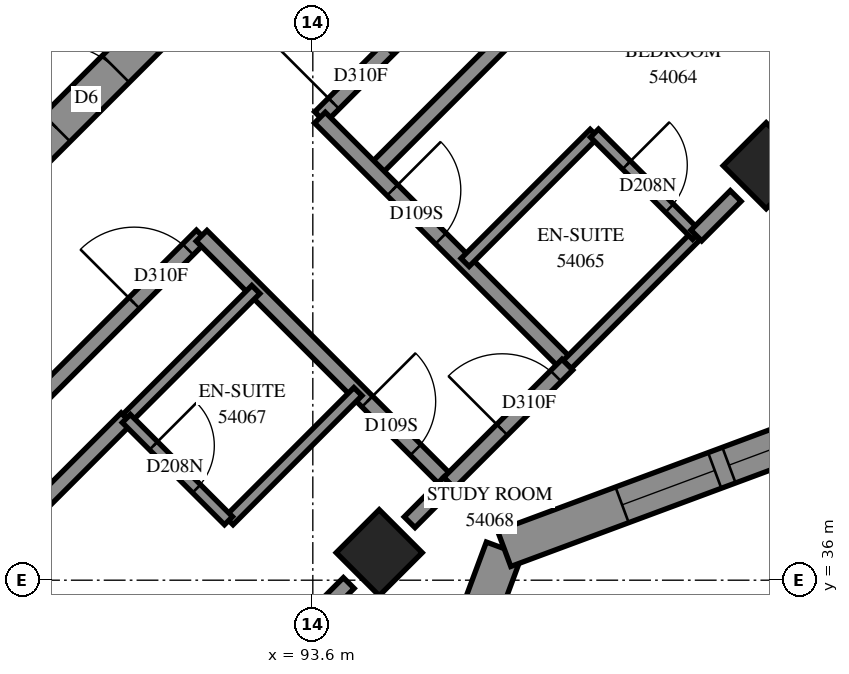
"""IFC4 building model, lengths in metres.
Left out: names, types, materials, properties, quantities, classifications, styles, units other than length and angle.
Written with IfcOpenShell. Run it as: python <this file> out.ifc"""

import sys

from ifc_helpers import new_model, si_unit, direction, frame, frame_2d, origin, origin_2d, place, context, subcontext, project, spatial, polyline, rectangle, outline, extrude, element, fill, save


model = new_model("IFC4")
c1 = context("Model", 3, precision=1e-05, world=origin(), true_north=direction((0.0, 1.0)))
c2 = subcontext(c1, "Body", "Model", "MODEL_VIEW")
j1 = project(units=[si_unit("LENGTHUNIT", "METRE"), si_unit("PLANEANGLEUNIT", "RADIAN")], contexts=[c1])
p1 = place(None, origin())
s1 = spatial("IfcSite", under=j1, at=p1, CompositionType="ELEMENT")
p2 = place(p1, origin())
s2 = spatial("IfcBuilding", under=s1, at=p2, CompositionType="ELEMENT")
p3 = place(p2, frame((0.0, 0.0, 199.8)))
s3 = spatial("IfcBuildingStorey", under=s2, at=p3, CompositionType="ELEMENT", Elevation=199.8)
for number, where, z_axis, x_axis in (
    (1, (99.565, 41.453, 0.0), (0.0, 0.0, 1.0), (0.707, -0.707, 0.0)),
    (2, (94.474, 36.362, 0.0), (0.0, 0.0, 1.0), (0.707, -0.707, 0.0)),
):
    element("IfcColumn", number, at=place(p3, frame(where, z_axis=z_axis, x_axis=x_axis)), inside=s3, PredefinedType="COLUMN", context=c2, shape_type="SweptSolid", body=[
        extrude(rectangle(XDim=0.8, YDim=0.8, at=origin_2d()), origin(), (0.0, 0.0, 1.0), 3.1),
    ])
p4 = place(p3, frame((87.013, 38.731, -0.3), z_axis=(0.0, 0.0, 1.0), x_axis=(0.7071067812, 0.7071067812, 0.0)))
e3 = element("IfcWall", 3, at=p4, inside=s3, PredefinedType="SHEAR", context=c2, shape_type="SweptSolid", body=[
    extrude(rectangle(XDim=14.4, YDim=0.5, at=frame_2d((7.2, 0.0))), origin(), (0.0, 0.0, 1.0), 2.7),
])
p5 = place(p4, frame((4.55, 0.0, 0.3)))
e4 = element("IfcOpeningElement", 4, at=p5, cuts=e3, PredefinedType="OPENING", context=c2, shape_type="SweptSolid", body=[
    extrude(rectangle(XDim=1.1, YDim=2.1, at=frame_2d((0.55, 1.05))), frame((0.0, 0.26, 0.0), z_axis=(0.0, -1.0, 0.0), x_axis=(1.0, 0.0, 0.0)), (0.0, 0.0, 1.0), 0.52),
])
p6 = place(p4, frame((11.35, 0.0, 0.3)))
e5 = element("IfcOpeningElement", 5, at=p6, cuts=e3, PredefinedType="OPENING", context=c2, shape_type="SweptSolid", body=[
    extrude(rectangle(XDim=1.1, YDim=2.1, at=frame_2d((0.55, 1.05))), frame((0.0, 0.26, 0.0), z_axis=(0.0, -1.0, 0.0), x_axis=(1.0, 0.0, 0.0)), (0.0, 0.0, 1.0), 0.52),
])
p7 = place(p3, frame((94.281, 31.47, 0.0), z_axis=(0.0, 0.0, 1.0), x_axis=(0.3481903374, 0.9374238577, 0.0)))
e6 = element("IfcWall", 6, at=p7, inside=s3, PredefinedType="SOLIDWALL", context=c2, shape_type="SweptSolid", body=[
    extrude(outline(polyline([(-0.12, -0.25), (5.16, -0.25), (5.39, 0.25), (0.12, 0.25), (-0.12, -0.25)])), origin(), (0.0, 0.0, 1.0), 3.1),
])
p8 = place(p7, frame((1.512, 0.0, 0.45)))
e7 = element("IfcOpeningElement", 7, at=p8, cuts=e6, PredefinedType="OPENING", context=c2, shape_type="SweptSolid", body=[
    extrude(rectangle(XDim=1.3, YDim=2.5, at=frame_2d((0.65, 1.25))), frame((0.0, 0.26, 0.0), z_axis=(0.0, -1.0, 0.0), x_axis=(1.0, 0.0, 0.0)), (0.0, 0.0, 1.0), 0.52),
])
p9 = place(p7, frame((3.012, 0.0, 0.45)))
e8 = element("IfcOpeningElement", 8, at=p9, cuts=e6, PredefinedType="OPENING", context=c2, shape_type="SweptSolid", body=[
    extrude(rectangle(XDim=1.3, YDim=2.5, at=frame_2d((0.65, 1.25))), frame((0.0, 0.26, 0.0), z_axis=(0.0, -1.0, 0.0), x_axis=(1.0, 0.0, 0.0)), (0.0, 0.0, 1.0), 0.52),
])
p10 = place(p3, frame((96.118, 36.415, 0.0), z_axis=(0.0, 0.0, 1.0), x_axis=(0.9374238577, 0.3481903374, 0.0)))
e9 = element("IfcWall", 9, at=p10, inside=s3, PredefinedType="SOLIDWALL", context=c2, shape_type="SweptSolid", body=[
    extrude(outline(polyline([(0.115, -0.25), (5.395, -0.25), (5.155, 0.25), (-0.115, 0.25), (0.115, -0.25)])), origin(), (0.0, 0.0, 1.0), 3.1),
])
p11 = place(p10, frame((1.655, 0.0, 0.45)))
e10 = element("IfcOpeningElement", 10, at=p11, cuts=e9, PredefinedType="OPENING", context=c2, shape_type="SweptSolid", body=[
    extrude(rectangle(XDim=1.3, YDim=2.5, at=frame_2d((0.65, 1.25))), frame((0.0, 0.26, 0.0), z_axis=(0.0, -1.0, 0.0), x_axis=(1.0, 0.0, 0.0)), (0.0, 0.0, 1.0), 0.52),
])
p12 = place(p10, frame((3.155, 0.0, 0.45)))
e11 = element("IfcOpeningElement", 11, at=p12, cuts=e9, PredefinedType="OPENING", context=c2, shape_type="SweptSolid", body=[
    extrude(rectangle(XDim=1.3, YDim=2.5, at=frame_2d((0.65, 1.25))), frame((0.0, 0.26, 0.0), z_axis=(0.0, -1.0, 0.0), x_axis=(1.0, 0.0, 0.0)), (0.0, 0.0, 1.0), 0.52),
])
p13 = place(p3, frame((93.695, 42.091, 0.0), z_axis=(0.0, 0.0, 1.0), x_axis=(0.7071067812, 0.7071067812, 0.0)))
e12 = element("IfcWall", 12, at=p13, inside=s3, PredefinedType="PARTITIONING", context=c2, shape_type="SweptSolid", body=[
    extrude(rectangle(XDim=9.899, YDim=0.2, at=frame_2d((4.95, 0.0))), origin(), (0.0, 0.0, 1.0), 3.1),
])
p14 = place(p13, frame((0.255, 0.0, 0.0)))
e13 = element("IfcOpeningElement", 13, at=p14, cuts=e12, PredefinedType="OPENING", context=c2, shape_type="SweptSolid", body=[
    extrude(rectangle(XDim=1.0, YDim=2.1, at=frame_2d((0.5, 1.05))), frame((0.0, 0.11, 0.0), z_axis=(0.0, -1.0, 0.0), x_axis=(1.0, 0.0, 0.0)), (0.0, 0.0, 1.0), 0.22),
])
p15 = place(p3, frame((84.984, 31.966, 0.0), z_axis=(0.0, 0.0, 1.0), x_axis=(0.7071067812, 0.7071067812, 0.0)))
e14 = element("IfcWall", 14, at=p15, inside=s3, PredefinedType="PARTITIONING", context=c2, shape_type="SweptSolid", body=[
    extrude(rectangle(XDim=8.719, YDim=0.2, at=frame_2d((4.359, 0.0))), origin(), (0.0, 0.0, 1.0), 3.1),
])
p16 = place(p3, frame((86.835, 35.231, 0.0), z_axis=(0.0, 0.0, 1.0), x_axis=(0.7071067812, 0.7071067812, 0.0)))
e15 = element("IfcWall", 15, at=p16, inside=s3, PredefinedType="PARTITIONING", context=c2, shape_type="SweptSolid", body=[
    extrude(rectangle(XDim=7.501, YDim=0.2, at=frame_2d((3.751, 0.0))), origin(), (0.0, 0.0, 1.0), 3.1),
])
p17 = place(p16, frame((6.243, 0.0, 0.0)))
e16 = element("IfcOpeningElement", 16, at=p17, cuts=e15, PredefinedType="OPENING", context=c2, shape_type="SweptSolid", body=[
    extrude(rectangle(XDim=1.0, YDim=2.1, at=frame_2d((0.5, 1.05))), frame((0.0, 0.11, 0.0), z_axis=(0.0, -1.0, 0.0), x_axis=(1.0, 0.0, 0.0)), (0.0, 0.0, 1.0), 0.22),
])
p18 = place(p3, frame((94.402, 41.382, 0.0), z_axis=(0.0, 0.0, 1.0), x_axis=(0.7072538072, 0.7069597246, 0.0)))
e17 = element("IfcWall", 17, at=p18, inside=s3, PredefinedType="PARTITIONING", context=c2, shape_type="SweptSolid", body=[
    extrude(rectangle(XDim=6.801, YDim=0.2, at=frame_2d((3.4, 0.0))), origin(), (0.0, 0.0, 1.0), 3.1),
])
p19 = place(p3, frame((89.781, 31.671, 0.0), z_axis=(0.0, 0.0, 1.0), x_axis=(0.7071067812, 0.7071067812, 0.0)))
e18 = element("IfcWall", 18, at=p19, inside=s3, PredefinedType="PARTITIONING", context=c2, shape_type="SweptSolid", body=[
    extrude(rectangle(XDim=6.07, YDim=0.2, at=frame_2d((3.035, 0.0))), origin(), (0.0, 0.0, 1.0), 2.6),
])
p20 = place(p3, frame((93.693, 42.085, 0.0), z_axis=(0.0, 0.0, 1.0), x_axis=(0.7071067812, -0.7071067812, 0.0)))
e19 = element("IfcWall", 19, at=p20, inside=s3, PredefinedType="PARTITIONING", context=c2, shape_type="SweptSolid", body=[
    extrude(rectangle(XDim=4.599, YDim=0.2, at=frame_2d((2.3, 0.0))), origin(), (0.0, 0.0, 1.0), 3.1),
])
p21 = place(p20, frame((1.349, 0.0, 0.0)))
e20 = element("IfcOpeningElement", 20, at=p21, cuts=e19, PredefinedType="OPENING", context=c2, shape_type="SweptSolid", body=[
    extrude(rectangle(XDim=0.9, YDim=2.1, at=frame_2d((0.45, 1.05))), frame((0.0, 0.11, 0.0), z_axis=(0.0, -1.0, 0.0), x_axis=(1.0, 0.0, 0.0)), (0.0, 0.0, 1.0), 0.22),
])
p22 = place(p3, frame((92.137, 40.531, 0.0), z_axis=(0.0, 0.0, 1.0), x_axis=(0.7071067812, -0.7071067812, 0.0)))
e21 = element("IfcWall", 21, at=p22, inside=s3, PredefinedType="PARTITIONING", context=c2, shape_type="SweptSolid", body=[
    extrude(rectangle(XDim=4.599, YDim=0.2, at=frame_2d((2.3, 0.0))), origin(), (0.0, 0.0, 1.0), 3.1),
])
p23 = place(p22, frame((3.083, 0.0, 0.0)))
e22 = element("IfcOpeningElement", 22, at=p23, cuts=e21, PredefinedType="OPENING", context=c2, shape_type="SweptSolid", body=[
    extrude(rectangle(XDim=0.9, YDim=2.1, at=frame_2d((0.45, 1.05))), frame((0.0, 0.11, 0.0), z_axis=(0.0, -1.0, 0.0), x_axis=(1.0, 0.0, 0.0)), (0.0, 0.0, 1.0), 0.22),
])
p24 = place(p3, frame((95.603, 40.181, 0.0), z_axis=(0.0, 0.0, 1.0), x_axis=(0.7071067812, 0.7071067812, 0.0)))
e23 = element("IfcWall", 23, at=p24, inside=s3, PredefinedType="PARTITIONING", context=c2, shape_type="SweptSolid", body=[
    extrude(rectangle(XDim=2.401, YDim=0.15, at=frame_2d((1.201, 0.0))), origin(), (0.0, 0.0, 1.0), 3.1),
])
p25 = place(p3, frame((96.947, 38.837, 0.0), z_axis=(0.0, 0.0, 1.0), x_axis=(0.7071067812, 0.7071067812, 0.0)))
e24 = element("IfcWall", 24, at=p25, inside=s3, PredefinedType="PARTITIONING", context=c2, shape_type="SweptSolid", body=[
    extrude(rectangle(XDim=2.401, YDim=0.15, at=frame_2d((1.201, 0.0))), origin(), (0.0, 0.0, 1.0), 2.6),
])
for number, where, z_axis, x_axis in (
    (25, (91.152, 38.128, 0.0), (0.0, 0.0, 1.0), (0.708, 0.707, 0.0)),
    (26, (92.497, 36.783, 0.0), (0.0, 0.0, 1.0), (0.707, 0.708, 0.0)),
):
    element("IfcWall", number, at=place(p3, frame(where, z_axis=z_axis, x_axis=x_axis)), inside=s3, PredefinedType="PARTITIONING", context=c2, shape_type="SweptSolid", body=[
        extrude(rectangle(XDim=2.4, YDim=0.15, at=frame_2d((1.2, 0.0))), origin(), (0.0, 0.0, 1.0), 3.1),
    ])
p26 = place(p3, frame((95.392, 37.282, 0.0), z_axis=(0.0, 0.0, 1.0), x_axis=(0.7075613659, 0.706651904, 0.0)))
e27 = element("IfcWall", 27, at=p26, inside=s3, PredefinedType="PARTITIONING", context=c2, shape_type="SweptSolid", body=[
    extrude(rectangle(XDim=2.199, YDim=0.2, at=frame_2d((1.1, 0.0))), origin(), (0.0, 0.0, 1.0), 2.6),
])
p27 = place(p26, frame((0.987, 0.0, 0.0)))
e28 = element("IfcOpeningElement", 28, at=p27, cuts=e27, PredefinedType="OPENING", context=c2, shape_type="SweptSolid", body=[
    extrude(rectangle(XDim=1.0, YDim=2.1, at=frame_2d((0.5, 1.05))), frame((0.0, 0.11, 0.0), z_axis=(0.0, -1.0, 0.0), x_axis=(1.0, 0.0, 0.0)), (0.0, 0.0, 1.0), 0.22),
])
p28 = place(p3, frame((97.305, 41.881, 0.0), z_axis=(0.0, 0.0, 1.0), x_axis=(0.7071067812, -0.7071067812, 0.0)))
e29 = element("IfcWall", 29, at=p28, inside=s3, PredefinedType="PARTITIONING", context=c2, shape_type="SweptSolid", body=[
    extrude(rectangle(XDim=1.901, YDim=0.15, at=frame_2d((0.95, 0.0))), origin(), (0.0, 0.0, 1.0), 3.1),
])
p29 = place(p28, frame((0.596, 0.0, 0.0)))
e30 = element("IfcOpeningElement", 30, at=p29, cuts=e29, PredefinedType="OPENING", context=c2, shape_type="SweptSolid", body=[
    extrude(rectangle(XDim=0.8, YDim=2.1, at=frame_2d((0.4, 1.05))), frame((0.0, 0.085, 0.0), z_axis=(0.0, -1.0, 0.0), x_axis=(1.0, 0.0, 0.0)), (0.0, 0.0, 1.0), 0.17),
])
p30 = place(p3, frame((91.147, 38.127, 0.0), z_axis=(0.0, 0.0, 1.0), x_axis=(0.7071067812, -0.7071067812, 0.0)))
e31 = element("IfcWall", 31, at=p30, inside=s3, PredefinedType="PARTITIONING", context=c2, shape_type="SweptSolid", body=[
    extrude(rectangle(XDim=1.901, YDim=0.15, at=frame_2d((0.95, 0.0))), origin(), (0.0, 0.0, 1.0), 3.1),
])
p31 = place(p30, frame((0.506, 0.0, 0.0)))
e32 = element("IfcOpeningElement", 32, at=p31, cuts=e31, PredefinedType="OPENING", context=c2, shape_type="SweptSolid", body=[
    extrude(rectangle(XDim=0.8, YDim=2.1, at=frame_2d((0.4, 1.05))), frame((0.0, 0.085, 0.0), z_axis=(0.0, -1.0, 0.0), x_axis=(1.0, 0.0, 0.0)), (0.0, 0.0, 1.0), 0.17),
])
for number, where, z_axis, x_axis in (
    (33, (98.645, 40.535, 0.0), (0.0, 0.0, 1.0), (0.706, 0.708, 0.0)),
    (34, (94.874, 36.763, 0.0), (0.0, 0.0, 1.0), (0.706, 0.708, 0.0)),
):
    element("IfcWall", number, at=place(p3, frame(where, z_axis=z_axis, x_axis=x_axis)), inside=s3, PredefinedType="PARTITIONING", context=c2, shape_type="SweptSolid", body=[
        extrude(rectangle(XDim=0.734, YDim=0.2, at=frame_2d((0.367, 0.0))), origin(), (0.0, 0.0, 1.0), 2.6),
    ])
p32 = place(p11, origin())
e35 = element("IfcWindow", 35, at=p32, inside=s3, PartitioningType="SINGLE_PANEL", PredefinedType="WINDOW", context=c2, shape_type="SweptSolid", body=[
    extrude(rectangle(XDim=1.3, YDim=2.5, at=frame_2d((0.65, 1.25))), frame((0.0, 0.18, 0.0), z_axis=(0.0, -1.0, 0.0), x_axis=(1.0, 0.0, 0.0)), (0.0, 0.0, 1.0), 0.06),
])
fill(e10, e35)
p33 = place(p12, origin())
e36 = element("IfcWindow", 36, at=p33, inside=s3, PartitioningType="SINGLE_PANEL", PredefinedType="WINDOW", context=c2, shape_type="SweptSolid", body=[
    extrude(rectangle(XDim=1.3, YDim=2.5, at=frame_2d((0.65, 1.25))), frame((0.0, 0.18, 0.0), z_axis=(0.0, -1.0, 0.0), x_axis=(1.0, 0.0, 0.0)), (0.0, 0.0, 1.0), 0.06),
])
fill(e11, e36)
p34 = place(p5, origin())
e37 = element("IfcDoor", 37, at=p34, inside=s3, OperationType="DOUBLE_DOOR_SINGLE_SWING", PredefinedType="DOOR", context=c2, shape_type="SweptSolid", body=[
    extrude(rectangle(XDim=1.1, YDim=2.1, at=frame_2d((0.55, 1.05))), frame((0.0, 0.025, 0.0), z_axis=(0.0, -1.0, 0.0), x_axis=(1.0, 0.0, 0.0)), (0.0, 0.0, 1.0), 0.05),
])
fill(e4, e37)
p35 = place(p14, origin())
e38 = element("IfcDoor", 38, at=p35, inside=s3, OperationType="SINGLE_SWING_LEFT", PredefinedType="DOOR", context=c2, shape_type="SweptSolid", body=[
    extrude(rectangle(XDim=1.0, YDim=2.1, at=frame_2d((0.5, 1.05))), frame((0.0, 0.025, 0.0), z_axis=(0.0, -1.0, 0.0), x_axis=(1.0, 0.0, 0.0)), (0.0, 0.0, 1.0), 0.05),
])
fill(e13, e38)
p36 = place(p17, origin())
e39 = element("IfcDoor", 39, at=p36, inside=s3, OperationType="SINGLE_SWING_RIGHT", PredefinedType="DOOR", context=c2, shape_type="SweptSolid", body=[
    extrude(rectangle(XDim=1.0, YDim=2.1, at=frame_2d((0.5, 1.05))), frame((0.0, 0.025, 0.0), z_axis=(0.0, -1.0, 0.0), x_axis=(1.0, 0.0, 0.0)), (0.0, 0.0, 1.0), 0.05),
])
fill(e16, e39)
p37 = place(p21, origin())
e40 = element("IfcDoor", 40, at=p37, inside=s3, OperationType="SINGLE_SWING_RIGHT", PredefinedType="DOOR", context=c2, shape_type="SweptSolid", body=[
    extrude(rectangle(XDim=0.9, YDim=2.1, at=frame_2d((0.45, 1.05))), frame((0.0, 0.025, 0.0), z_axis=(0.0, -1.0, 0.0), x_axis=(1.0, 0.0, 0.0)), (0.0, 0.0, 1.0), 0.05),
])
fill(e20, e40)
p38 = place(p29, origin())
e41 = element("IfcDoor", 41, at=p38, inside=s3, OperationType="SINGLE_SWING_RIGHT", PredefinedType="DOOR", context=c2, shape_type="SweptSolid", body=[
    extrude(rectangle(XDim=0.8, YDim=2.1, at=frame_2d((0.4, 1.05))), frame((0.0, 0.025, 0.0), z_axis=(0.0, -1.0, 0.0), x_axis=(1.0, 0.0, 0.0)), (0.0, 0.0, 1.0), 0.05),
])
fill(e30, e41)
p39 = place(p23, origin())
e42 = element("IfcDoor", 42, at=p39, inside=s3, OperationType="SINGLE_SWING_LEFT", PredefinedType="DOOR", context=c2, shape_type="SweptSolid", body=[
    extrude(rectangle(XDim=0.9, YDim=2.1, at=frame_2d((0.45, 1.05))), frame((0.0, 0.025, 0.0), z_axis=(0.0, -1.0, 0.0), x_axis=(1.0, 0.0, 0.0)), (0.0, 0.0, 1.0), 0.05),
])
fill(e22, e42)
p40 = place(p31, origin())
e43 = element("IfcDoor", 43, at=p40, inside=s3, OperationType="SINGLE_SWING_RIGHT", PredefinedType="DOOR", context=c2, shape_type="SweptSolid", body=[
    extrude(rectangle(XDim=0.8, YDim=2.1, at=frame_2d((0.4, 1.05))), frame((0.0, 0.025, 0.0), z_axis=(0.0, -1.0, 0.0), x_axis=(1.0, 0.0, 0.0)), (0.0, 0.0, 1.0), 0.05),
])
fill(e32, e43)
p41 = place(p27, origin())
e44 = element("IfcDoor", 44, at=p41, inside=s3, OperationType="SINGLE_SWING_RIGHT", PredefinedType="DOOR", context=c2, shape_type="SweptSolid", body=[
    extrude(rectangle(XDim=1.0, YDim=2.1, at=frame_2d((0.5, 1.05))), frame((0.0, 0.025, 0.0), z_axis=(0.0, -1.0, 0.0), x_axis=(1.0, 0.0, 0.0)), (0.0, 0.0, 1.0), 0.05),
])
fill(e28, e44)
save(model, sys.argv[1])
